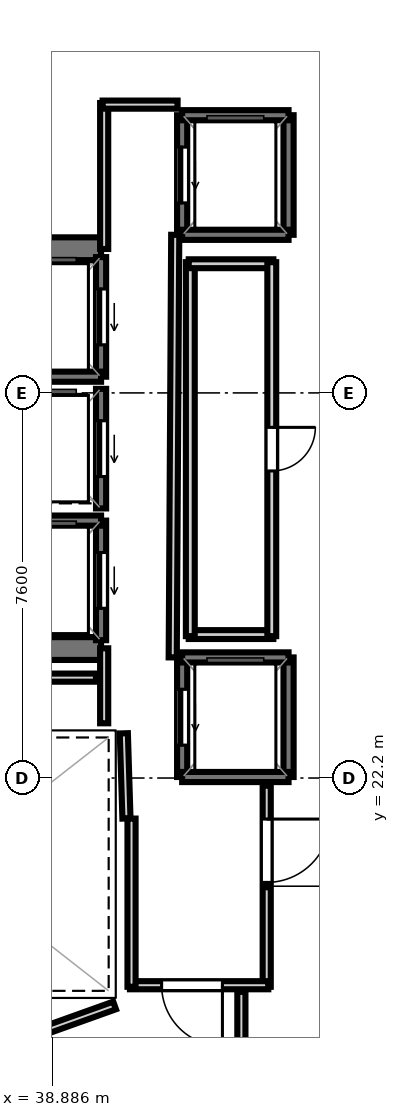
"""IFC4 building model, lengths in metres.
Left out: names, types, materials, properties, quantities, classifications, styles, units other than length and angle.
Written with IfcOpenShell. Run it as: python <this file> out.ifc"""

import sys

from ifc_helpers import new_model, si_unit, direction, frame, frame_2d, origin, place, context, subcontext, project, spatial, rectangle, extrude, element, fill, save


model = new_model("IFC4")
c1 = context("Model", 3, precision=1e-05, world=origin(), true_north=direction((0.0, 1.0)))
c2 = subcontext(c1, "Body", "Model", "MODEL_VIEW")
j1 = project(units=[si_unit("LENGTHUNIT", "METRE"), si_unit("PLANEANGLEUNIT", "RADIAN")], contexts=[c1])
p1 = place(None, origin())
s1 = spatial("IfcSite", under=j1, at=p1, CompositionType="ELEMENT")
p2 = place(p1, origin())
s2 = spatial("IfcBuilding", under=s1, at=p2, CompositionType="ELEMENT")
p3 = place(p2, frame((0.0, 0.0, 333.3)))
s3 = spatial("IfcBuildingStorey", under=s2, at=p3, CompositionType="ELEMENT", Elevation=333.3)
p4 = place(p3, frame((29.33, 32.645, 0.0), z_axis=(0.0, 0.0, 1.0), x_axis=(1.0, 0.0, 0.0)))
e1 = element("IfcWall", 1, at=p4, inside=s3, PredefinedType="SHEAR", context=c2, shape_type="SweptSolid", body=[
    extrude(rectangle(XDim=10.52, YDim=0.45, at=frame_2d((5.26, 0.0))), origin(), (0.0, 0.0, 1.0), 3.52),
])
p5 = place(p4, frame((0.895, 0.0, 0.0)))
e2 = element("IfcOpeningElement", 2, at=p5, cuts=e1, PredefinedType="OPENING", context=c2, shape_type="SweptSolid", body=[
    extrude(rectangle(XDim=1.25, YDim=2.15, at=frame_2d((0.625, 1.075))), frame((0.0, 0.235, 0.0), z_axis=(0.0, -1.0, 0.0), x_axis=(1.0, 0.0, 0.0)), (0.0, 0.0, 1.0), 0.47),
])
p6 = place(p3, frame((29.33, 24.755, 0.0), z_axis=(0.0, 0.0, 1.0), x_axis=(1.0, 0.0, 0.0)))
e3 = element("IfcWall", 3, at=p6, inside=s3, PredefinedType="SHEAR", context=c2, shape_type="SweptSolid", body=[
    extrude(rectangle(XDim=10.52, YDim=0.45, at=frame_2d((5.26, 0.0))), origin(), (0.0, 0.0, 1.0), 3.52),
])
p7 = place(p6, frame((0.695, 0.0, 0.0)))
e4 = element("IfcOpeningElement", 4, at=p7, cuts=e3, PredefinedType="OPENING", context=c2, shape_type="SweptSolid", body=[
    extrude(rectangle(XDim=1.25, YDim=2.15, at=frame_2d((0.625, 1.075))), frame((0.0, 0.235, 0.0), z_axis=(0.0, -1.0, 0.0), x_axis=(1.0, 0.0, 0.0)), (0.0, 0.0, 1.0), 0.47),
])
p8 = place(p3, frame((39.85, 30.12, 0.0), z_axis=(0.0, 0.0, 1.0), x_axis=(0.0, 1.0, 0.0)))
e5 = element("IfcWall", 5, at=p8, inside=s3, PredefinedType="SOLIDWALL", context=c2, shape_type="SweptSolid", body=[
    extrude(rectangle(XDim=2.36, YDim=0.2, at=frame_2d((1.18, 0.0))), origin(), (0.0, 0.0, 1.0), 3.52),
])
p9 = place(p8, frame((0.63, 0.0, 0.0)))
e6 = element("IfcOpeningElement", 6, at=p9, cuts=e5, PredefinedType="OPENING", context=c2, shape_type="SweptSolid", body=[
    extrude(rectangle(XDim=1.1, YDim=2.15, at=frame_2d((0.55, 1.075))), frame((0.0, 0.11, 0.0), z_axis=(0.0, -1.0, 0.0), x_axis=(1.0, 0.0, 0.0)), (0.0, 0.0, 1.0), 0.22),
])
p10 = place(p3, frame((37.75, 30.12, 0.0), z_axis=(0.0, 0.0, 1.0), x_axis=(1.0, 0.0, 0.0)))
e7 = element("IfcWall", 7, at=p10, inside=s3, PredefinedType="SOLIDWALL", context=c2, shape_type="SweptSolid", body=[
    extrude(rectangle(XDim=2.1, YDim=0.2, at=frame_2d((1.05, 0.0))), origin(), (0.0, 0.0, 1.0), 3.52),
])
p11 = place(p3, frame((39.85, 24.92, 0.0), z_axis=(0.0, 0.0, 1.0), x_axis=(0.0, 1.0, 0.0)))
e8 = element("IfcWall", 8, at=p11, inside=s3, PredefinedType="SOLIDWALL", context=c2, shape_type="SweptSolid", body=[
    extrude(rectangle(XDim=2.36, YDim=0.2, at=frame_2d((1.18, 0.0))), origin(), (0.0, 0.0, 1.0), 3.52),
])
p12 = place(p11, frame((0.63, 0.0, 0.0)))
e9 = element("IfcOpeningElement", 9, at=p12, cuts=e8, PredefinedType="OPENING", context=c2, shape_type="SweptSolid", body=[
    extrude(rectangle(XDim=1.1, YDim=2.15, at=frame_2d((0.55, 1.075))), frame((0.0, 0.11, 0.0), z_axis=(0.0, -1.0, 0.0), x_axis=(1.0, 0.0, 0.0)), (0.0, 0.0, 1.0), 0.22),
])
p13 = place(p3, frame((37.75, 27.28, 0.0), z_axis=(0.0, 0.0, 1.0), x_axis=(1.0, 0.0, 0.0)))
e10 = element("IfcWall", 10, at=p13, inside=s3, PredefinedType="SOLIDWALL", context=c2, shape_type="SweptSolid", body=[
    extrude(rectangle(XDim=2.1, YDim=0.2, at=frame_2d((1.05, 0.0))), origin(), (0.0, 0.0, 1.0), 3.52),
])
p14 = place(p3, frame((39.85, 27.52, 0.0), z_axis=(0.0, 0.0, 1.0), x_axis=(0.0, 1.0, 0.0)))
e11 = element("IfcWall", 11, at=p14, inside=s3, PredefinedType="SOLIDWALL", context=c2, shape_type="SweptSolid", body=[
    extrude(rectangle(XDim=2.36, YDim=0.2, at=frame_2d((1.18, 0.0))), origin(), (0.0, 0.0, 1.0), 3.52),
])
p15 = place(p14, frame((0.63, 0.0, 0.0)))
e12 = element("IfcOpeningElement", 12, at=p15, cuts=e11, PredefinedType="OPENING", context=c2, shape_type="SweptSolid", body=[
    extrude(rectangle(XDim=1.1, YDim=2.15, at=frame_2d((0.55, 1.075))), frame((0.0, 0.11, 0.0), z_axis=(0.0, -1.0, 0.0), x_axis=(1.0, 0.0, 0.0)), (0.0, 0.0, 1.0), 0.22),
])
p16 = place(p3, frame((43.55, 22.22, 0.0), z_axis=(0.0, 0.0, 1.0), x_axis=(0.0, 1.0, 0.0)))
e13 = element("IfcWall", 13, at=p16, inside=s3, PredefinedType="SOLIDWALL", context=c2, shape_type="SweptSolid", body=[
    extrude(rectangle(XDim=2.36, YDim=0.2, at=frame_2d((1.18, 0.0))), origin(), (0.0, 0.0, 1.0), 3.52),
])
p17 = place(p3, frame((41.45, 22.22, 0.0), z_axis=(0.0, 0.0, 1.0), x_axis=(0.0, 1.0, 0.0)))
e14 = element("IfcWall", 14, at=p17, inside=s3, PredefinedType="SOLIDWALL", context=c2, shape_type="SweptSolid", body=[
    extrude(rectangle(XDim=2.36, YDim=0.2, at=frame_2d((1.18, 0.0))), origin(), (0.0, 0.0, 1.0), 3.52),
])
p18 = place(p17, frame((0.63, 0.0, 0.0)))
e15 = element("IfcOpeningElement", 15, at=p18, cuts=e14, PredefinedType="OPENING", context=c2, shape_type="SweptSolid", body=[
    extrude(rectangle(XDim=1.1, YDim=2.15, at=frame_2d((0.55, 1.075))), frame((0.0, 0.11, 0.0), z_axis=(0.0, -1.0, 0.0), x_axis=(1.0, 0.0, 0.0)), (0.0, 0.0, 1.0), 0.22),
])
for number, where, z_axis, x_axis in (
    (16, (41.45, 24.58, 0.0), (0.0, 0.0, 1.0), (1.0, 0.0, 0.0)),
    (17, (41.45, 22.22, 0.0), (0.0, 0.0, 1.0), (1.0, 0.0, 0.0)),
):
    element("IfcWall", number, at=place(p3, frame(where, z_axis=z_axis, x_axis=x_axis)), inside=s3, PredefinedType="SOLIDWALL", context=c2, shape_type="SweptSolid", body=[
        extrude(rectangle(XDim=2.1, YDim=0.2, at=frame_2d((1.05, 0.0))), origin(), (0.0, 0.0, 1.0), 3.52),
    ])
p19 = place(p3, frame((43.55, 32.92, 0.0), z_axis=(0.0, 0.0, 1.0), x_axis=(0.0, 1.0, 0.0)))
e18 = element("IfcWall", 18, at=p19, inside=s3, PredefinedType="SOLIDWALL", context=c2, shape_type="SweptSolid", body=[
    extrude(rectangle(XDim=2.36, YDim=0.2, at=frame_2d((1.18, 0.0))), origin(), (0.0, 0.0, 1.0), 3.52),
])
p20 = place(p3, frame((41.45, 32.92, 0.0), z_axis=(0.0, 0.0, 1.0), x_axis=(0.0, 1.0, 0.0)))
e19 = element("IfcWall", 19, at=p20, inside=s3, PredefinedType="SOLIDWALL", context=c2, shape_type="SweptSolid", body=[
    extrude(rectangle(XDim=2.36, YDim=0.2, at=frame_2d((1.18, 0.0))), origin(), (0.0, 0.0, 1.0), 3.52),
])
p21 = place(p20, frame((0.63, 0.0, 0.0)))
e20 = element("IfcOpeningElement", 20, at=p21, cuts=e19, PredefinedType="OPENING", context=c2, shape_type="SweptSolid", body=[
    extrude(rectangle(XDim=1.1, YDim=2.15, at=frame_2d((0.55, 1.075))), frame((0.0, 0.11, 0.0), z_axis=(0.0, -1.0, 0.0), x_axis=(1.0, 0.0, 0.0)), (0.0, 0.0, 1.0), 0.22),
])
for number, where, z_axis, x_axis in (
    (21, (41.45, 35.28, 0.0), (0.0, 0.0, 1.0), (1.0, 0.0, 0.0)),
    (22, (41.45, 32.92, 0.0), (0.0, 0.0, 1.0), (1.0, 0.0, 0.0)),
):
    element("IfcWall", number, at=place(p3, frame(where, z_axis=z_axis, x_axis=x_axis)), inside=s3, PredefinedType="SOLIDWALL", context=c2, shape_type="SweptSolid", body=[
        extrude(rectangle(XDim=2.1, YDim=0.2, at=frame_2d((1.05, 0.0))), origin(), (0.0, 0.0, 1.0), 3.52),
    ])
p22 = place(p3, frame((40.351, 21.401, 0.0), z_axis=(0.0, 0.0, 1.0), x_axis=(-0.031058045979, 0.999517582527, 0.0)))
e23 = element("IfcWall", 23, at=p22, inside=s3, PredefinedType="PARTITIONING", context=c2, shape_type="SweptSolid", body=[
    extrude(rectangle(XDim=1.682, YDim=0.16, at=frame_2d((0.841, 0.0))), origin(), (0.0, 0.0, 1.0), 2.84),
])
p23 = place(p3, frame((39.911, 23.28, 0.0), z_axis=(0.0, 0.0, 1.0), x_axis=(0.0, 1.0, 0.0)))
e24 = element("IfcWall", 24, at=p23, inside=s3, PredefinedType="PARTITIONING", context=c2, shape_type="SweptSolid", body=[
    extrude(rectangle(XDim=1.48, YDim=0.16, at=frame_2d((0.74, 0.0))), origin(), (0.0, 0.0, 1.0), 2.84),
])
p24 = place(p3, frame((39.911, 32.64, 0.0), z_axis=(0.0, 0.0, 1.0), x_axis=(0.0, 1.0, 0.0)))
e25 = element("IfcWall", 25, at=p24, inside=s3, PredefinedType="PARTITIONING", context=c2, shape_type="SweptSolid", body=[
    extrude(rectangle(XDim=2.88, YDim=0.16, at=frame_2d((1.44, 0.0))), origin(), (0.0, 0.0, 1.0), 2.84),
])
p25 = place(p3, frame((39.88, 35.489, 0.0), z_axis=(0.0, 0.0, 1.0), x_axis=(1.0, 0.0, 0.0)))
e26 = element("IfcWall", 26, at=p25, inside=s3, PredefinedType="PARTITIONING", context=c2, shape_type="SweptSolid", body=[
    extrude(rectangle(XDim=1.48, YDim=0.16, at=frame_2d((0.74, 0.0))), origin(), (0.0, 0.0, 1.0), 2.84),
])
p26 = place(p3, frame((41.313, 32.92, 0.0), z_axis=(0.0, 0.0, 1.0), x_axis=(-0.005942518022, -0.999982343084, 0.0)))
e27 = element("IfcWall", 27, at=p26, inside=s3, PredefinedType="PARTITIONING", context=c2, shape_type="SweptSolid", body=[
    extrude(rectangle(XDim=8.34, YDim=0.16, at=frame_2d((4.17, 0.0))), origin(), (0.0, 0.0, 1.0), 2.84),
])
p27 = place(p3, frame((43.119, 22.05, 0.0), z_axis=(0.0, 0.0, 1.0), x_axis=(0.0, -1.0, 0.0)))
e28 = element("IfcWall", 28, at=p27, inside=s3, PredefinedType="PARTITIONING", context=c2, shape_type="SweptSolid", body=[
    extrude(rectangle(XDim=3.97, YDim=0.16, at=frame_2d((1.985, 0.0))), origin(), (0.0, 0.0, 1.0), 2.84),
])
p28 = place(p27, frame((0.66, 0.0, 0.0)))
e29 = element("IfcOpeningElement", 29, at=p28, cuts=e28, PredefinedType="OPENING", context=c2, shape_type="SweptSolid", body=[
    extrude(rectangle(XDim=1.25, YDim=2.2, at=frame_2d((0.625, 1.1))), frame((0.0, 0.09, 0.0), z_axis=(0.0, -1.0, 0.0), x_axis=(1.0, 0.0, 0.0)), (0.0, 0.0, 1.0), 0.18),
])
p29 = place(p3, frame((43.15, 18.111, 0.0), z_axis=(0.0, 0.0, 1.0), x_axis=(-1.0, 0.0, 0.0)))
e30 = element("IfcWall", 30, at=p29, inside=s3, PredefinedType="PARTITIONING", context=c2, shape_type="SweptSolid", body=[
    extrude(rectangle(XDim=2.73, YDim=0.16, at=frame_2d((1.365, 0.0))), origin(), (0.0, 0.0, 1.0), 2.84),
])
p30 = place(p29, frame((0.905, 0.0, 0.0)))
e31 = element("IfcOpeningElement", 31, at=p30, cuts=e30, PredefinedType="OPENING", context=c2, shape_type="SweptSolid", body=[
    extrude(rectangle(XDim=1.2, YDim=2.15, at=frame_2d((0.6, 1.075))), frame((0.0, 0.09, 0.0), z_axis=(0.0, -1.0, 0.0), x_axis=(1.0, 0.0, 0.0)), (0.0, 0.0, 1.0), 0.18),
])
p31 = place(p3, frame((40.451, 18.08, 0.0), z_axis=(0.0, 0.0, 1.0), x_axis=(0.0, 1.0, 0.0)))
e32 = element("IfcWall", 32, at=p31, inside=s3, PredefinedType="PARTITIONING", context=c2, shape_type="SweptSolid", body=[
    extrude(rectangle(XDim=3.32, YDim=0.16, at=frame_2d((1.66, 0.0))), origin(), (0.0, 0.0, 1.0), 2.84),
])
p32 = place(p3, frame((43.25, 25.031, 0.0), z_axis=(0.0, 0.0, 1.0), x_axis=(-1.0, 0.0, 0.0)))
e33 = element("IfcWall", 33, at=p32, inside=s3, PredefinedType="PLUMBINGWALL", context=c2, shape_type="SweptSolid", body=[
    extrude(rectangle(XDim=1.67, YDim=0.175, at=frame_2d((0.835, 0.0))), origin(), (0.0, 0.0, 1.0), 2.84),
])
p33 = place(p3, frame((41.611, 25.0, 0.0), z_axis=(0.0, 0.0, 1.0), x_axis=(0.0, 1.0, 0.0)))
e34 = element("IfcWall", 34, at=p33, inside=s3, PredefinedType="PLUMBINGWALL", context=c2, shape_type="SweptSolid", body=[
    extrude(rectangle(XDim=7.38, YDim=0.175, at=frame_2d((3.69, 0.0))), origin(), (0.0, 0.0, 1.0), 2.84),
])
p34 = place(p3, frame((41.58, 32.349, 0.0), z_axis=(0.0, 0.0, 1.0), x_axis=(1.0, 0.0, 0.0)))
e35 = element("IfcWall", 35, at=p34, inside=s3, PredefinedType="PLUMBINGWALL", context=c2, shape_type="SweptSolid", body=[
    extrude(rectangle(XDim=1.67, YDim=0.175, at=frame_2d((0.835, 0.0))), origin(), (0.0, 0.0, 1.0), 2.84),
])
p35 = place(p3, frame((43.219, 32.38, 0.0), z_axis=(0.0, 0.0, 1.0), x_axis=(0.0, -1.0, 0.0)))
e36 = element("IfcWall", 36, at=p35, inside=s3, PredefinedType="PLUMBINGWALL", context=c2, shape_type="SweptSolid", body=[
    extrude(rectangle(XDim=7.38, YDim=0.175, at=frame_2d((3.69, 0.0))), origin(), (0.0, 0.0, 1.0), 2.84),
])
p36 = place(p35, frame((3.26, 0.0, 0.0)))
e37 = element("IfcOpeningElement", 37, at=p36, cuts=e36, PredefinedType="OPENING", context=c2, shape_type="SweptSolid", body=[
    extrude(rectangle(XDim=0.86, YDim=2.05, at=frame_2d((0.43, 1.025))), frame((0.0, 0.097, 0.0), z_axis=(0.0, -1.0, 0.0), x_axis=(1.0, 0.0, 0.0)), (0.0, 0.0, 1.0), 0.195),
])
p37 = place(p3, frame((39.75, 24.181, 0.0), z_axis=(0.0, 0.0, 1.0), x_axis=(-1.0, 0.0, 0.0)))
e38 = element("IfcWall", 38, at=p37, inside=s3, PredefinedType="PARTITIONING", context=c2, shape_type="SweptSolid", body=[
    extrude(rectangle(XDim=6.22, YDim=0.16, at=frame_2d((3.11, 0.0))), origin(), (0.0, 0.0, 1.0), 2.84),
])
p38 = place(p3, frame((36.81, 16.529, 0.0), z_axis=(0.0, 0.0, 1.0), x_axis=(0.941548344365, 0.33687789364, 0.0)))
e39 = element("IfcWall", 39, at=p38, inside=s3, PredefinedType="PARTITIONING", context=c2, shape_type="SweptSolid", body=[
    extrude(rectangle(XDim=3.513, YDim=0.16, at=frame_2d((1.756, 0.0))), origin(), (0.0, 0.0, 1.0), 2.84),
])
p39 = place(p3, frame((42.619, 17.98, 0.0), z_axis=(0.0, 0.0, 1.0), x_axis=(0.0, -1.0, 0.0)))
e40 = element("IfcWall", 40, at=p39, inside=s3, PredefinedType="PARTITIONING", context=c2, shape_type="SweptSolid", body=[
    extrude(rectangle(XDim=1.93, YDim=0.16, at=frame_2d((0.965, 0.0))), origin(), (0.0, 0.0, 1.0), 2.84),
])
p40 = place(p9, origin())
e41 = element("IfcDoor", 41, at=p40, inside=s3, OperationType="SLIDING_TO_LEFT", PredefinedType="DOOR", context=c2, shape_type="SweptSolid", body=[
    extrude(rectangle(XDim=1.1, YDim=2.15, at=frame_2d((0.55, 1.075))), frame((0.0, 0.025, 0.0), z_axis=(0.0, -1.0, 0.0), x_axis=(1.0, 0.0, 0.0)), (0.0, 0.0, 1.0), 0.05),
])
fill(e6, e41)
p41 = place(p12, origin())
e42 = element("IfcDoor", 42, at=p41, inside=s3, OperationType="SLIDING_TO_LEFT", PredefinedType="DOOR", context=c2, shape_type="SweptSolid", body=[
    extrude(rectangle(XDim=1.1, YDim=2.15, at=frame_2d((0.55, 1.075))), frame((0.0, 0.025, 0.0), z_axis=(0.0, -1.0, 0.0), x_axis=(1.0, 0.0, 0.0)), (0.0, 0.0, 1.0), 0.05),
])
fill(e9, e42)
p42 = place(p15, origin())
e43 = element("IfcDoor", 43, at=p42, inside=s3, OperationType="SLIDING_TO_LEFT", PredefinedType="DOOR", context=c2, shape_type="SweptSolid", body=[
    extrude(rectangle(XDim=1.1, YDim=2.15, at=frame_2d((0.55, 1.075))), frame((0.0, 0.025, 0.0), z_axis=(0.0, -1.0, 0.0), x_axis=(1.0, 0.0, 0.0)), (0.0, 0.0, 1.0), 0.05),
])
fill(e12, e43)
p43 = place(p18, origin())
e44 = element("IfcDoor", 44, at=p43, inside=s3, OperationType="SLIDING_TO_LEFT", PredefinedType="DOOR", context=c2, shape_type="SweptSolid", body=[
    extrude(rectangle(XDim=1.1, YDim=2.15, at=frame_2d((0.55, 1.075))), frame((0.0, 0.025, 0.0), z_axis=(0.0, -1.0, 0.0), x_axis=(1.0, 0.0, 0.0)), (0.0, 0.0, 1.0), 0.05),
])
fill(e15, e44)
p44 = place(p21, origin())
e45 = element("IfcDoor", 45, at=p44, inside=s3, OperationType="SLIDING_TO_LEFT", PredefinedType="DOOR", context=c2, shape_type="SweptSolid", body=[
    extrude(rectangle(XDim=1.1, YDim=2.15, at=frame_2d((0.55, 1.075))), frame((0.0, 0.025, 0.0), z_axis=(0.0, -1.0, 0.0), x_axis=(1.0, 0.0, 0.0)), (0.0, 0.0, 1.0), 0.05),
])
fill(e20, e45)
p45 = place(p30, origin())
e46 = element("IfcDoor", 46, at=p45, inside=s3, OperationType="SINGLE_SWING_LEFT", PredefinedType="DOOR", context=c2, shape_type="SweptSolid", body=[
    extrude(rectangle(XDim=1.2, YDim=2.15, at=frame_2d((0.6, 1.075))), frame((0.0, 0.025, 0.0), z_axis=(0.0, -1.0, 0.0), x_axis=(1.0, 0.0, 0.0)), (0.0, 0.0, 1.0), 0.05),
])
fill(e31, e46)
p46 = place(p28, origin())
e47 = element("IfcDoor", 47, at=p46, inside=s3, OperationType="SINGLE_SWING_LEFT", PredefinedType="DOOR", context=c2, shape_type="SweptSolid", body=[
    extrude(rectangle(XDim=1.25, YDim=2.2, at=frame_2d((0.625, 1.1))), frame((0.0, 0.025, 0.0), z_axis=(0.0, -1.0, 0.0), x_axis=(1.0, 0.0, 0.0)), (0.0, 0.0, 1.0), 0.05),
])
fill(e29, e47)
p47 = place(p36, origin())
e48 = element("IfcDoor", 48, at=p47, inside=s3, OperationType="SINGLE_SWING_LEFT", PredefinedType="DOOR", context=c2, shape_type="SweptSolid", body=[
    extrude(rectangle(XDim=0.86, YDim=2.05, at=frame_2d((0.43, 1.025))), frame((0.0, 0.025, 0.0), z_axis=(0.0, -1.0, 0.0), x_axis=(1.0, 0.0, 0.0)), (0.0, 0.0, 1.0), 0.05),
])
fill(e37, e48)
save(model, sys.argv[1])
